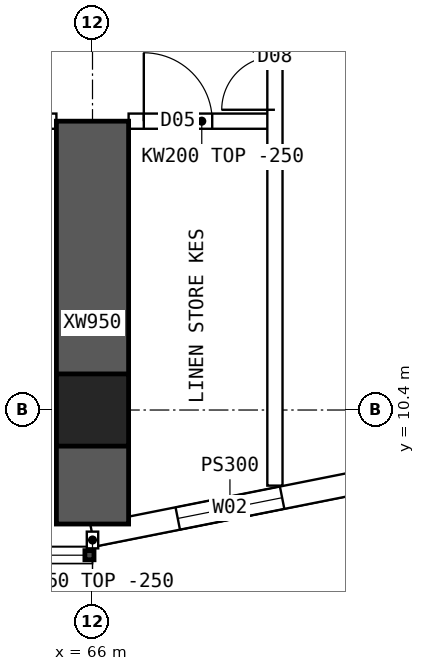
"""IFC4 building model, lengths in metres.
Left out: names, types, materials, properties, quantities, classifications, styles, units other than length and angle.
Written with IfcOpenShell. Run it as: python <this file> out.ifc"""

import sys

from ifc_helpers import new_model, si_unit, direction, frame, frame_2d, origin, origin_2d, place, context, subcontext, project, spatial, polyline, rectangle, hollow_rectangle, outline, extrude, element, fill, save


model = new_model("IFC4")
c1 = context("Model", 3, precision=1e-05, world=origin(), true_north=direction((0.0, 1.0)))
c2 = subcontext(c1, "Body", "Model", "MODEL_VIEW")
j1 = project(units=[si_unit("LENGTHUNIT", "METRE"), si_unit("PLANEANGLEUNIT", "RADIAN")], contexts=[c1])
p1 = place(None, origin())
s1 = spatial("IfcSite", under=j1, at=p1, CompositionType="ELEMENT")
p2 = place(p1, origin())
s2 = spatial("IfcBuilding", under=s1, at=p2, CompositionType="ELEMENT")
p3 = place(p2, frame((0.0, 0.0, 121.9)))
s3 = spatial("IfcBuildingStorey", under=s2, at=p3, CompositionType="ELEMENT", Elevation=121.9)
p4 = place(p3, frame((66.0, 10.4, 0.0), z_axis=(0.0, 0.0, 1.0), x_axis=(1.0, 0.0, 0.0)))
e1 = element("IfcColumn", 1, at=p4, inside=s3, PredefinedType="COLUMN", context=c2, shape_type="SweptSolid", body=[
    extrude(hollow_rectangle(XDim=0.95, YDim=0.95, WallThickness=0.095, at=origin_2d()), origin(), (0.0, 0.0, 1.0), 3.75),
])
p5 = place(p3, frame((66.0, 8.9, 0.0), z_axis=(0.0, 0.0, 1.0), x_axis=(0.0, 1.0, 0.0)))
e2 = element("IfcWall", 2, at=p5, inside=s3, PredefinedType="SHEAR", context=c2, shape_type="SweptSolid", body=[
    extrude(rectangle(XDim=5.3, YDim=0.95, at=frame_2d((2.65, 0.0))), origin(), (0.0, 0.0, 1.0), 3.75),
])
p6 = place(p3, frame((66.0, 8.75, 0.0), z_axis=(0.0, 0.0, 1.0), x_axis=(0.980791473772, 0.195059183267, 0.0)))
e3 = element("IfcWall", 3, at=p6, inside=s3, PredefinedType="SOLIDWALL", context=c2, shape_type="SweptSolid", body=[
    extrude(outline(polyline([(-0.03, -0.15), (3.717, -0.15), (3.657, 0.15), (0.03, 0.15), (-0.03, -0.15)])), origin(), (0.0, 0.0, 1.0), 3.5),
])
p7 = place(p6, frame((1.144, 0.0, 0.9)))
e4 = element("IfcOpeningElement", 4, at=p7, cuts=e3, PredefinedType="OPENING", context=c2, shape_type="SweptSolid", body=[
    extrude(rectangle(XDim=1.4, YDim=1.8, at=frame_2d((0.7, 0.9))), frame((0.0, 0.16, 0.0), z_axis=(0.0, -1.0, 0.0), x_axis=(1.0, 0.0, 0.0)), (0.0, 0.0, 1.0), 0.32),
])
p8 = place(p3, frame((60.475, 14.2, 0.0), z_axis=(0.0, 0.0, 1.0), x_axis=(1.0, 0.0, 0.0)))
e5 = element("IfcWall", 5, at=p8, inside=s3, PredefinedType="SOLIDWALL", context=c2, shape_type="SweptSolid", body=[
    extrude(outline(polyline([(0.0, 0.0), (5.05, 0.0), (5.05, 3.1), (0.0, 3.1), (0.0, 0.0)])), frame((0.0, 0.1, 0.0), z_axis=(0.0, -1.0, 0.0), x_axis=(1.0, 0.0, 0.0)), (0.0, 0.0, 1.0), 0.2),
])
p9 = place(p8, frame((0.1, 0.0, 0.0)))
e6 = element("IfcOpeningElement", 6, at=p9, cuts=e5, PredefinedType="OPENING", context=c2, shape_type="SweptSolid", body=[
    extrude(rectangle(XDim=0.9, YDim=2.1, at=frame_2d((0.45, 1.05))), frame((0.0, 0.11, 0.0), z_axis=(0.0, -1.0, 0.0), x_axis=(1.0, 0.0, 0.0)), (0.0, 0.0, 1.0), 0.22),
])
p10 = place(p8, frame((3.9, 0.0, 0.0)))
e7 = element("IfcOpeningElement", 7, at=p10, cuts=e5, PredefinedType="OPENING", context=c2, shape_type="SweptSolid", body=[
    extrude(rectangle(XDim=0.9, YDim=2.1, at=frame_2d((0.45, 1.05))), frame((0.0, 0.11, 0.0), z_axis=(0.0, -1.0, 0.0), x_axis=(1.0, 0.0, 0.0)), (0.0, 0.0, 1.0), 0.22),
])
p11 = place(p3, frame((66.475, 14.2, 0.0), z_axis=(0.0, 0.0, 1.0), x_axis=(1.0, 0.0, 0.0)))
e8 = element("IfcWall", 8, at=p11, inside=s3, PredefinedType="SOLIDWALL", context=c2, shape_type="SweptSolid", body=[
    extrude(rectangle(XDim=1.925, YDim=0.2, at=frame_2d((0.962, 0.0))), origin(), (0.0, 0.0, 1.0), 3.5),
])
p12 = place(p11, frame((0.2, 0.0, 0.0)))
e9 = element("IfcOpeningElement", 9, at=p12, cuts=e8, PredefinedType="OPENING", context=c2, shape_type="SweptSolid", body=[
    extrude(rectangle(XDim=0.9, YDim=2.1, at=frame_2d((0.45, 1.05))), frame((0.0, 0.11, 0.0), z_axis=(0.0, -1.0, 0.0), x_axis=(1.0, 0.0, 0.0)), (0.0, 0.0, 1.0), 0.22),
])
p13 = place(p3, frame((68.4, 9.405, 0.0), z_axis=(0.0, 0.0, 1.0), x_axis=(0.0, 1.0, 0.0)))
e10 = element("IfcWall", 10, at=p13, inside=s3, PredefinedType="SOLIDWALL", context=c2, shape_type="SweptSolid", body=[
    extrude(rectangle(XDim=45.189, YDim=0.2, at=frame_2d((22.595, 0.0))), origin(), (0.0, 0.0, 1.0), 3.5),
])
p14 = place(p13, frame((13.795, 0.0, 0.0)))
e11 = element("IfcOpeningElement", 11, at=p14, cuts=e10, PredefinedType="OPENING", context=c2, shape_type="SweptSolid", body=[
    extrude(rectangle(XDim=1.2, YDim=2.1, at=frame_2d((0.6, 1.05))), frame((0.0, 0.11, 0.0), z_axis=(0.0, -1.0, 0.0), x_axis=(1.0, 0.0, 0.0)), (0.0, 0.0, 1.0), 0.22),
])
p15 = place(p13, frame((4.945, 0.0, 0.0)))
e12 = element("IfcOpeningElement", 12, at=p15, cuts=e10, PredefinedType="OPENING", context=c2, shape_type="SweptSolid", body=[
    extrude(rectangle(XDim=1.4, YDim=2.1, at=frame_2d((0.7, 1.05))), frame((0.0, 0.11, 0.0), z_axis=(0.0, -1.0, 0.0), x_axis=(1.0, 0.0, 0.0)), (0.0, 0.0, 1.0), 0.22),
])
p16 = place(p13, frame((38.745, 0.0, 0.0)))
e13 = element("IfcOpeningElement", 13, at=p16, cuts=e10, PredefinedType="OPENING", context=c2, shape_type="SweptSolid", body=[
    extrude(rectangle(XDim=1.4, YDim=2.1, at=frame_2d((0.7, 1.05))), frame((0.0, 0.11, 0.0), z_axis=(0.0, -1.0, 0.0), x_axis=(1.0, 0.0, 0.0)), (0.0, 0.0, 1.0), 0.22),
])
p17 = place(p3, frame((66.0, 8.8, 0.0), z_axis=(0.0, 0.0, 1.0), x_axis=(0.0, -1.0, 0.0)))
e14 = element("IfcWall", 14, at=p17, inside=s3, PredefinedType="PARTITIONING", context=c2, shape_type="SweptSolid", body=[
    extrude(rectangle(XDim=0.22, YDim=0.15, at=frame_2d((0.11, 0.0))), origin(), (0.0, 0.0, 1.0), 3.5),
])
p18 = place(p7, origin())
e15 = element("IfcWindow", 15, at=p18, inside=s3, PartitioningType="SINGLE_PANEL", PredefinedType="WINDOW", context=c2, shape_type="SweptSolid", body=[
    extrude(rectangle(XDim=1.4, YDim=1.8, at=frame_2d((0.7, 0.9))), frame((0.0, 0.03, 0.0), z_axis=(0.0, -1.0, 0.0), x_axis=(1.0, 0.0, 0.0)), (0.0, 0.0, 1.0), 0.06),
])
fill(e4, e15)
p19 = place(p15, origin())
e16 = element("IfcDoor", 16, at=p19, inside=s3, OperationType="DOUBLE_DOOR_SINGLE_SWING", PredefinedType="DOOR", context=c2, shape_type="SweptSolid", body=[
    extrude(rectangle(XDim=1.4, YDim=2.1, at=frame_2d((0.7, 1.05))), frame((0.0, 0.025, 0.0), z_axis=(0.0, -1.0, 0.0), x_axis=(1.0, 0.0, 0.0)), (0.0, 0.0, 1.0), 0.05),
])
fill(e12, e16)
p20 = place(p12, origin())
e17 = element("IfcDoor", 17, at=p20, inside=s3, OperationType="SINGLE_SWING_LEFT", PredefinedType="DOOR", context=c2, shape_type="SweptSolid", body=[
    extrude(rectangle(XDim=0.9, YDim=2.1, at=frame_2d((0.45, 1.05))), frame((0.0, 0.025, 0.0), z_axis=(0.0, -1.0, 0.0), x_axis=(1.0, 0.0, 0.0)), (0.0, 0.0, 1.0), 0.05),
])
fill(e9, e17)
save(model, sys.argv[1])
